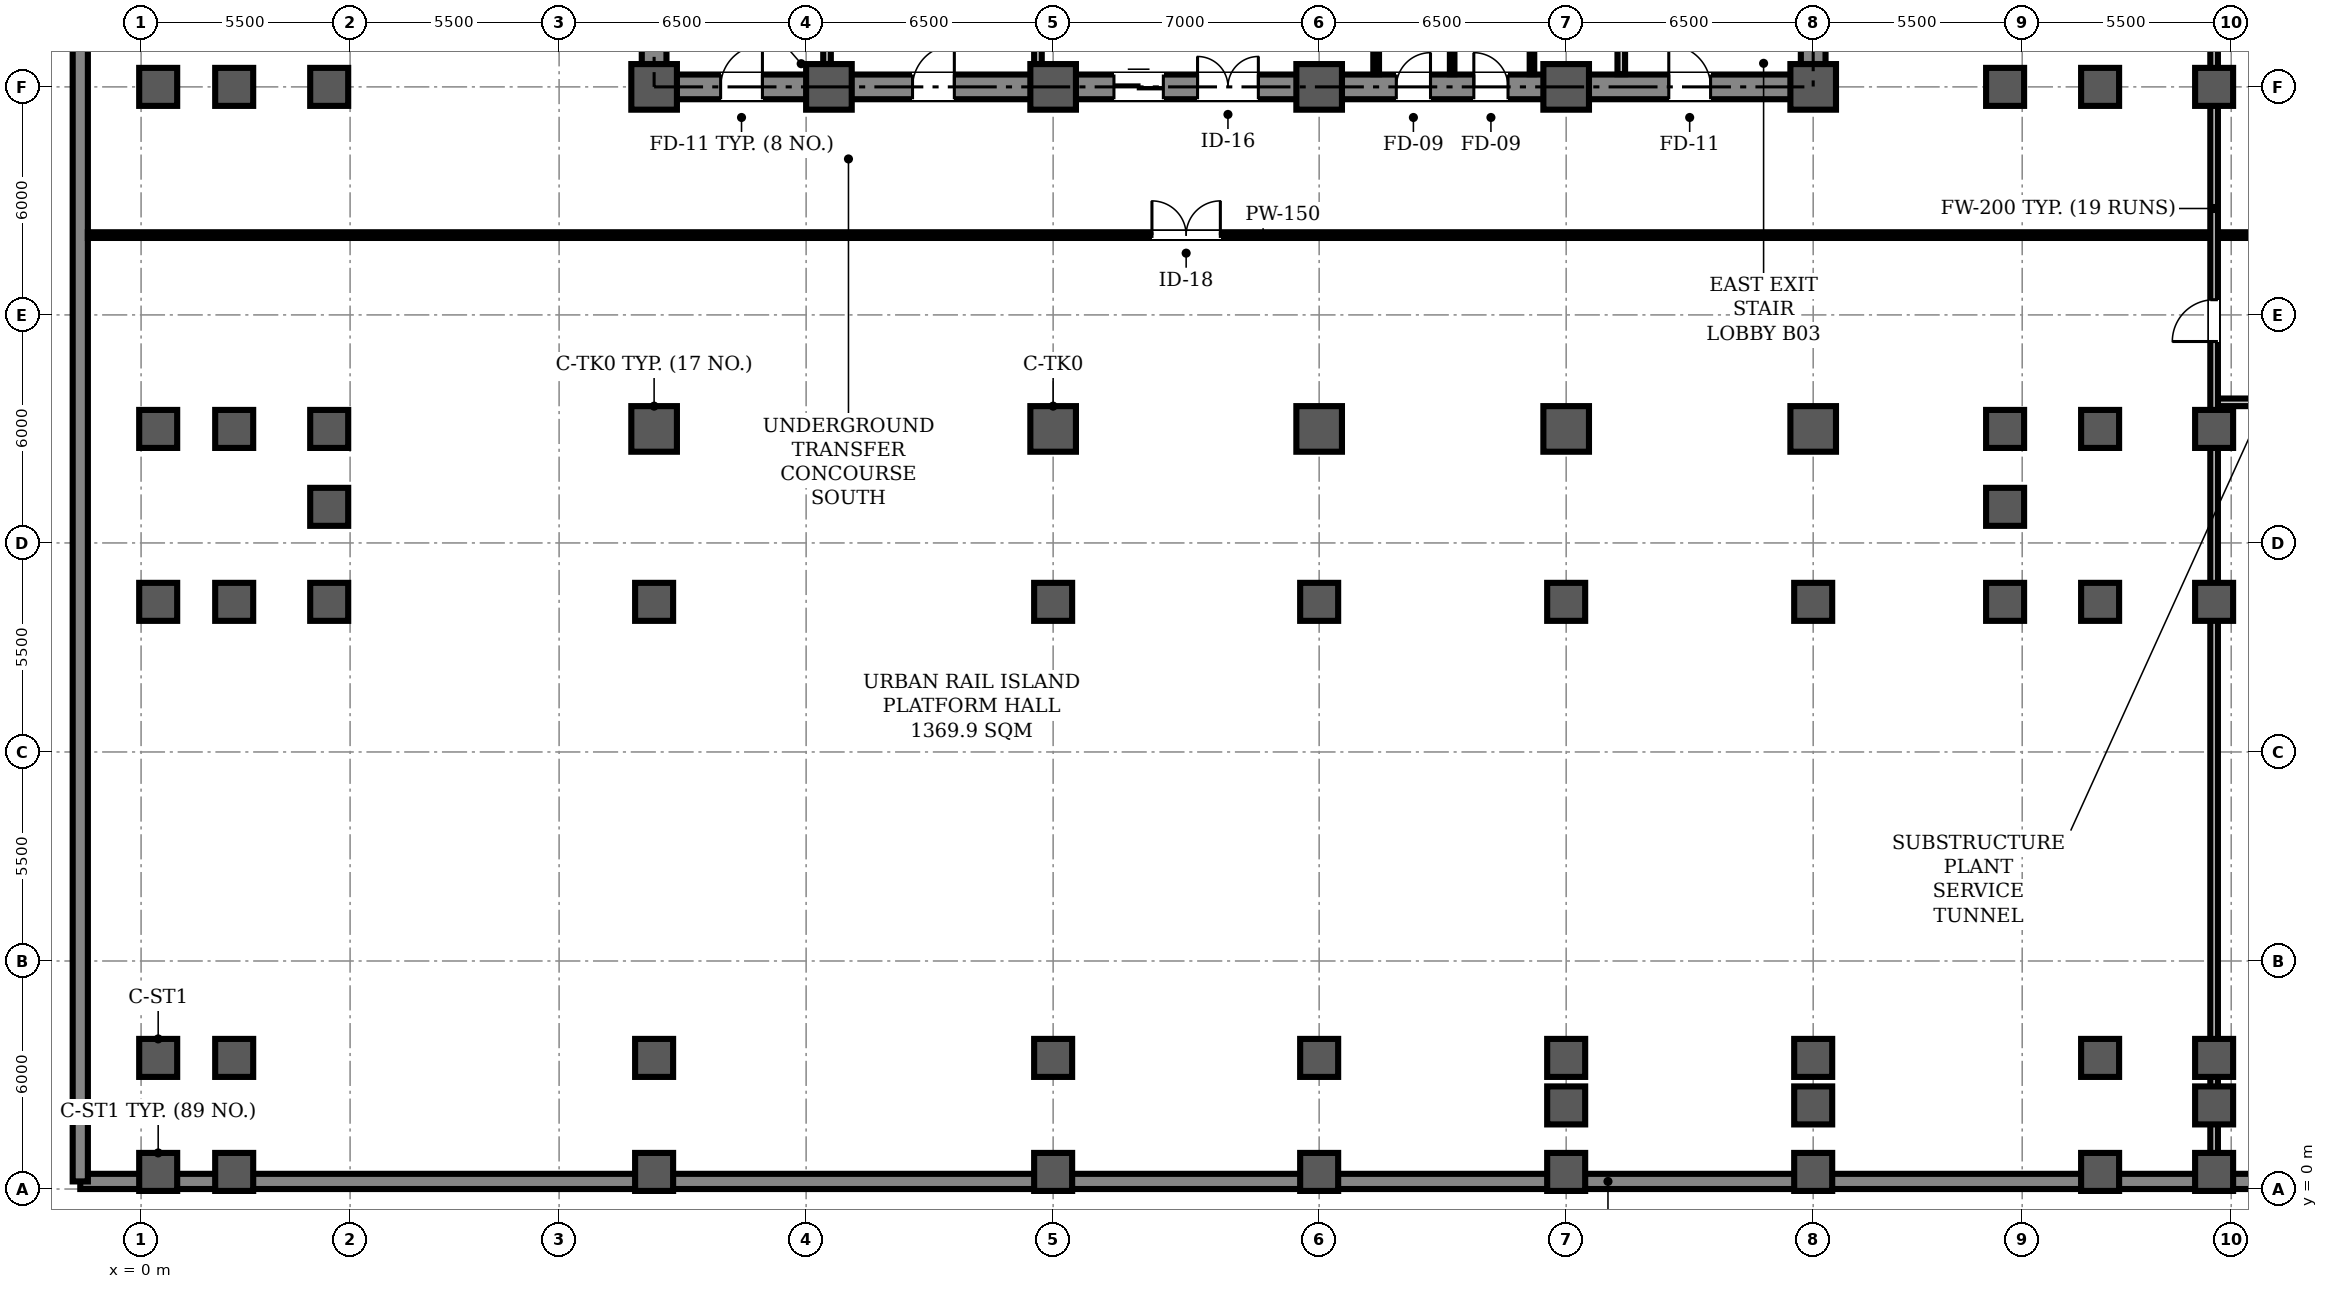
"""IFC4 building model, lengths in metres.
Left out: names, types, materials, properties, quantities, classifications, styles, units other than length and angle.
Written with IfcOpenShell. Run it as: python <this file> out.ifc"""

import sys

from ifc_helpers import new_model, si_unit, direction, frame, frame_2d, origin, origin_2d, place, context, subcontext, project, spatial, rectangle, hollow_rectangle, extrude, element, fill, save


model = new_model("IFC4")
c1 = context("Model", 3, precision=1e-05, world=origin(), true_north=direction((0.0, 1.0)))
c2 = subcontext(c1, "Body", "Model", "MODEL_VIEW")
j1 = project(units=[si_unit("LENGTHUNIT", "METRE"), si_unit("PLANEANGLEUNIT", "RADIAN")], contexts=[c1])
p1 = place(None, origin())
s1 = spatial("IfcSite", under=j1, at=p1, CompositionType="ELEMENT")
p2 = place(p1, origin())
s2 = spatial("IfcBuilding", under=s1, at=p2, CompositionType="ELEMENT")
p3 = place(p2, frame((0.0, 0.0, -15.6)))
s3 = spatial("IfcBuildingStorey", under=s2, at=p3, CompositionType="ELEMENT", Elevation=-15.6)
for number, where, z_axis, x_axis in (
    (1, (13.5, 29.0, 0.0), (0.0, 0.0, 1.0), (1.0, 0.0, 0.0)),
    (2, (18.1, 29.0, 0.0), (0.0, 0.0, 1.0), (1.0, 0.0, 0.0)),
    (3, (24.0, 29.0, 0.0), (0.0, 0.0, 1.0), (1.0, 0.0, 0.0)),
    (4, (31.0, 29.0, 0.0), (0.0, 0.0, 1.0), (1.0, 0.0, 0.0)),
    (5, (37.5, 29.0, 0.0), (0.0, 0.0, 1.0), (1.0, 0.0, 0.0)),
    (6, (44.0, 29.0, 0.0), (0.0, 0.0, 1.0), (1.0, 0.0, 0.0)),
    (7, (13.5, 20.0, 0.0), (0.0, 0.0, 1.0), (1.0, 0.0, 0.0)),
    (8, (24.0, 20.0, 0.0), (0.0, 0.0, 1.0), (1.0, 0.0, 0.0)),
    (9, (31.0, 20.0, 0.0), (0.0, 0.0, 1.0), (1.0, 0.0, 0.0)),
    (10, (37.5, 20.0, 0.0), (0.0, 0.0, 1.0), (1.0, 0.0, 0.0)),
    (11, (44.0, 20.0, 0.0), (0.0, 0.0, 1.0), (1.0, 0.0, 0.0)),
):
    element("IfcColumn", number, at=place(p3, frame(where, z_axis=z_axis, x_axis=x_axis)), inside=s3, PredefinedType="COLUMN", context=c2, shape_type="SweptSolid", body=[
        extrude(hollow_rectangle(XDim=1.2, YDim=1.2, WallThickness=0.04, InnerFilletRadius=0.02, OuterFilletRadius=0.06, at=origin_2d()), origin(), (0.0, 0.0, 1.0), 5.4),
    ])
for number, where, z_axis, x_axis in (
    (12, (0.45, 0.45, 0.0), (0.0, 0.0, 1.0), (1.0, 0.0, 0.0)),
    (13, (0.45, 3.45, 0.0), (0.0, 0.0, 1.0), (1.0, 0.0, 0.0)),
    (14, (0.45, 15.45, 0.0), (0.0, 0.0, 1.0), (1.0, 0.0, 0.0)),
    (15, (0.45, 20.0, 0.0), (0.0, 0.0, 1.0), (1.0, 0.0, 0.0)),
    (16, (0.45, 29.0, 0.0), (0.0, 0.0, 1.0), (1.0, 0.0, 0.0)),
    (17, (2.45, 0.45, 0.0), (0.0, 0.0, 1.0), (1.0, 0.0, 0.0)),
    (18, (2.45, 3.45, 0.0), (0.0, 0.0, 1.0), (1.0, 0.0, 0.0)),
    (19, (2.45, 15.45, 0.0), (0.0, 0.0, 1.0), (1.0, 0.0, 0.0)),
    (20, (2.45, 20.0, 0.0), (0.0, 0.0, 1.0), (1.0, 0.0, 0.0)),
    (21, (2.45, 29.0, 0.0), (0.0, 0.0, 1.0), (1.0, 0.0, 0.0)),
    (22, (4.95, 15.45, 0.0), (0.0, 0.0, 1.0), (1.0, 0.0, 0.0)),
    (23, (4.95, 17.95, 0.0), (0.0, 0.0, 1.0), (1.0, 0.0, 0.0)),
    (24, (4.95, 20.0, 0.0), (0.0, 0.0, 1.0), (1.0, 0.0, 0.0)),
    (25, (4.95, 29.0, 0.0), (0.0, 0.0, 1.0), (1.0, 0.0, 0.0)),
    (26, (13.5, 0.45, 0.0), (0.0, 0.0, 1.0), (1.0, 0.0, 0.0)),
    (27, (13.5, 3.45, 0.0), (0.0, 0.0, 1.0), (1.0, 0.0, 0.0)),
    (28, (13.5, 15.45, 0.0), (0.0, 0.0, 1.0), (1.0, 0.0, 0.0)),
    (29, (24.0, 0.45, 0.0), (0.0, 0.0, 1.0), (1.0, 0.0, 0.0)),
    (30, (24.0, 3.45, 0.0), (0.0, 0.0, 1.0), (1.0, 0.0, 0.0)),
    (31, (24.0, 15.45, 0.0), (0.0, 0.0, 1.0), (1.0, 0.0, 0.0)),
    (32, (31.0, 0.45, 0.0), (0.0, 0.0, 1.0), (1.0, 0.0, 0.0)),
    (33, (31.0, 3.45, 0.0), (0.0, 0.0, 1.0), (1.0, 0.0, 0.0)),
    (34, (31.0, 15.45, 0.0), (0.0, 0.0, 1.0), (1.0, 0.0, 0.0)),
    (35, (37.5, 0.45, 0.0), (0.0, 0.0, 1.0), (1.0, 0.0, 0.0)),
    (36, (37.5, 2.2, 0.0), (0.0, 0.0, 1.0), (1.0, 0.0, 0.0)),
    (37, (37.5, 3.45, 0.0), (0.0, 0.0, 1.0), (1.0, 0.0, 0.0)),
    (38, (37.5, 15.45, 0.0), (0.0, 0.0, 1.0), (1.0, 0.0, 0.0)),
    (39, (44.0, 0.45, 0.0), (0.0, 0.0, 1.0), (1.0, 0.0, 0.0)),
    (40, (44.0, 2.2, 0.0), (0.0, 0.0, 1.0), (1.0, 0.0, 0.0)),
    (41, (44.0, 3.45, 0.0), (0.0, 0.0, 1.0), (1.0, 0.0, 0.0)),
    (42, (44.0, 15.45, 0.0), (0.0, 0.0, 1.0), (1.0, 0.0, 0.0)),
    (43, (49.05, 15.45, 0.0), (0.0, 0.0, 1.0), (1.0, 0.0, 0.0)),
    (44, (49.05, 17.95, 0.0), (0.0, 0.0, 1.0), (1.0, 0.0, 0.0)),
    (45, (49.05, 20.0, 0.0), (0.0, 0.0, 1.0), (1.0, 0.0, 0.0)),
    (46, (49.05, 29.0, 0.0), (0.0, 0.0, 1.0), (1.0, 0.0, 0.0)),
    (47, (51.55, 0.45, 0.0), (0.0, 0.0, 1.0), (1.0, 0.0, 0.0)),
    (48, (51.55, 3.45, 0.0), (0.0, 0.0, 1.0), (1.0, 0.0, 0.0)),
    (49, (51.55, 15.45, 0.0), (0.0, 0.0, 1.0), (1.0, 0.0, 0.0)),
    (50, (51.55, 20.0, 0.0), (0.0, 0.0, 1.0), (1.0, 0.0, 0.0)),
    (51, (51.55, 29.0, 0.0), (0.0, 0.0, 1.0), (1.0, 0.0, 0.0)),
    (52, (54.55, 0.45, 0.0), (0.0, 0.0, 1.0), (1.0, 0.0, 0.0)),
    (53, (54.55, 2.2, 0.0), (0.0, 0.0, 1.0), (1.0, 0.0, 0.0)),
    (54, (54.55, 3.45, 0.0), (0.0, 0.0, 1.0), (1.0, 0.0, 0.0)),
    (55, (54.55, 15.45, 0.0), (0.0, 0.0, 1.0), (1.0, 0.0, 0.0)),
    (56, (54.55, 20.0, 0.0), (0.0, 0.0, 1.0), (1.0, 0.0, 0.0)),
    (57, (54.55, 29.0, 0.0), (0.0, 0.0, 1.0), (1.0, 0.0, 0.0)),
):
    element("IfcColumn", number, at=place(p3, frame(where, z_axis=z_axis, x_axis=x_axis)), inside=s3, PredefinedType="COLUMN", context=c2, shape_type="SweptSolid", body=[
        extrude(rectangle(XDim=1.0, YDim=1.0, at=origin_2d()), origin(), (0.0, 0.0, 1.0), 5.4),
    ])
p4 = place(p3, frame((-1.6, 0.2, 0.0), z_axis=(0.0, 0.0, 1.0), x_axis=(1.0, 0.0, 0.0)))
e58 = element("IfcWall", 58, at=p4, inside=s3, PredefinedType="SOLIDWALL", context=c2, shape_type="SweptSolid", body=[
    extrude(rectangle(XDim=80.4, YDim=0.4, at=frame_2d((40.2, 0.0))), origin(), (0.0, 0.0, 1.0), 5.12),
])
p5 = place(p3, frame((-1.6, 51.4, 0.0), z_axis=(0.0, 0.0, 1.0), x_axis=(0.0, -1.0, 0.0)))
e59 = element("IfcWall", 59, at=p5, inside=s3, PredefinedType="SOLIDWALL", context=c2, shape_type="SweptSolid", body=[
    extrude(rectangle(XDim=51.2, YDim=0.4, at=frame_2d((25.6, 0.0))), origin(), (0.0, 0.0, 1.0), 5.12),
])
p6 = place(p3, frame((13.5, 29.0, 0.0), z_axis=(0.0, 0.0, 1.0), x_axis=(1.0, 0.0, 0.0)))
e60 = element("IfcWall", 60, at=p6, inside=s3, PredefinedType="SHEAR", context=c2, shape_type="SweptSolid", body=[
    extrude(rectangle(XDim=30.5, YDim=0.65, at=frame_2d((15.25, 0.0))), origin(), (0.0, 0.0, 1.0), 5.12),
])
p7 = place(p6, frame((1.75, 0.0, 0.0)))
e61 = element("IfcOpeningElement", 61, at=p7, cuts=e60, PredefinedType="OPENING", context=c2, shape_type="SweptSolid", body=[
    extrude(rectangle(XDim=1.1, YDim=2.08, at=frame_2d((0.55, 1.04))), frame((0.0, 0.335, 0.0), z_axis=(0.0, -1.0, 0.0), x_axis=(1.0, 0.0, 0.0)), (0.0, 0.0, 1.0), 0.67),
])
p8 = place(p6, frame((26.7, 0.0, 0.0)))
e62 = element("IfcOpeningElement", 62, at=p8, cuts=e60, PredefinedType="OPENING", context=c2, shape_type="SweptSolid", body=[
    extrude(rectangle(XDim=1.1, YDim=2.08, at=frame_2d((0.55, 1.04))), frame((0.0, 0.335, 0.0), z_axis=(0.0, -1.0, 0.0), x_axis=(1.0, 0.0, 0.0)), (0.0, 0.0, 1.0), 0.67),
])
p9 = place(p6, frame((6.8, 0.0, 0.0)))
e63 = element("IfcOpeningElement", 63, at=p9, cuts=e60, PredefinedType="OPENING", context=c2, shape_type="SweptSolid", body=[
    extrude(rectangle(XDim=1.1, YDim=2.08, at=frame_2d((0.55, 1.04))), frame((0.0, 0.335, 0.0), z_axis=(0.0, -1.0, 0.0), x_axis=(1.0, 0.0, 0.0)), (0.0, 0.0, 1.0), 0.67),
])
p10 = place(p6, frame((14.3, 0.0, 0.0)))
e64 = element("IfcOpeningElement", 64, at=p10, cuts=e60, PredefinedType="OPENING", context=c2, shape_type="SweptSolid", body=[
    extrude(rectangle(XDim=1.6, YDim=2.08, at=frame_2d((0.8, 1.04))), frame((0.0, 0.335, 0.0), z_axis=(0.0, -1.0, 0.0), x_axis=(1.0, 0.0, 0.0)), (0.0, 0.0, 1.0), 0.67),
])
p11 = place(p6, frame((19.53, 0.0, 0.0)))
e65 = element("IfcOpeningElement", 65, at=p11, cuts=e60, PredefinedType="OPENING", context=c2, shape_type="SweptSolid", body=[
    extrude(rectangle(XDim=0.9, YDim=2.08, at=frame_2d((0.45, 1.04))), frame((0.0, 0.335, 0.0), z_axis=(0.0, -1.0, 0.0), x_axis=(1.0, 0.0, 0.0)), (0.0, 0.0, 1.0), 0.67),
])
p12 = place(p6, frame((21.57, 0.0, 0.0)))
e66 = element("IfcOpeningElement", 66, at=p12, cuts=e60, PredefinedType="OPENING", context=c2, shape_type="SweptSolid", body=[
    extrude(rectangle(XDim=0.9, YDim=2.08, at=frame_2d((0.45, 1.04))), frame((0.0, 0.335, 0.0), z_axis=(0.0, -1.0, 0.0), x_axis=(1.0, 0.0, 0.0)), (0.0, 0.0, 1.0), 0.67),
])
p13 = place(p6, frame((12.1, 0.0, 0.0)))
e67 = element("IfcOpeningElement", 67, at=p13, cuts=e60, PredefinedType="OPENING", context=c2, shape_type="SweptSolid", body=[
    extrude(rectangle(XDim=1.3, YDim=2.08, at=frame_2d((0.65, 1.04))), frame((0.0, 0.335, 0.0), z_axis=(0.0, -1.0, 0.0), x_axis=(1.0, 0.0, 0.0)), (0.0, 0.0, 1.0), 0.67),
])
for number, where, z_axis, x_axis in (
    (68, (13.5, 29.35, 0.0), (0.0, 0.0, 1.0), (0.0, 1.0, 0.0)),
    (69, (44.0, 29.35, 0.0), (0.0, 0.0, 1.0), (0.0, 1.0, 0.0)),
):
    element("IfcWall", number, at=place(p3, frame(where, z_axis=z_axis, x_axis=x_axis)), inside=s3, PredefinedType="SHEAR", context=c2, shape_type="SweptSolid", body=[
        extrude(rectangle(XDim=8.6, YDim=0.65, at=frame_2d((4.3, 0.0))), origin(), (0.0, 0.0, 1.0), 5.12),
    ])
p14 = place(p3, frame((-1.4, 25.1, 0.0), z_axis=(0.0, 0.0, 1.0), x_axis=(1.0, 0.0, 0.0)))
e70 = element("IfcWall", 70, at=p14, inside=s3, PredefinedType="PARTITIONING", context=c2, shape_type="SweptSolid", body=[
    extrude(rectangle(XDim=61.85, YDim=0.15, at=frame_2d((30.925, 0.0))), origin(), (0.0, 0.0, 1.0), 4.4),
])
p15 = place(p14, frame((28.0, 0.0, 0.0)))
e71 = element("IfcOpeningElement", 71, at=p15, cuts=e70, PredefinedType="OPENING", context=c2, shape_type="SweptSolid", body=[
    extrude(rectangle(XDim=1.8, YDim=2.08, at=frame_2d((0.9, 1.04))), frame((0.0, 0.085, 0.0), z_axis=(0.0, -1.0, 0.0), x_axis=(1.0, 0.0, 0.0)), (0.0, 0.0, 1.0), 0.17),
])
p16 = place(p3, frame((54.55, 20.7, 0.0), z_axis=(0.0, 0.0, 1.0), x_axis=(1.0, 0.0, 0.0)))
e72 = element("IfcWall", 72, at=p16, inside=s3, PredefinedType="STANDARD", context=c2, shape_type="SweptSolid", body=[
    extrude(rectangle(XDim=5.9, YDim=0.2, at=frame_2d((2.95, 0.0))), origin(), (0.0, 0.0, 1.0), 4.4),
])
p17 = place(p3, frame((54.55, 0.4, 0.0), z_axis=(0.0, 0.0, 1.0), x_axis=(0.0, 1.0, 0.0)))
e73 = element("IfcWall", 73, at=p17, inside=s3, PredefinedType="STANDARD", context=c2, shape_type="SweptSolid", body=[
    extrude(rectangle(XDim=50.8, YDim=0.2, at=frame_2d((25.4, 0.0))), origin(), (0.0, 0.0, 1.0), 4.3),
])
p18 = place(p17, frame((21.9, 0.0, 0.0)))
e74 = element("IfcOpeningElement", 74, at=p18, cuts=e73, PredefinedType="OPENING", context=c2, shape_type="SweptSolid", body=[
    extrude(rectangle(XDim=1.1, YDim=2.08, at=frame_2d((0.55, 1.04))), frame((0.0, 0.11, 0.0), z_axis=(0.0, -1.0, 0.0), x_axis=(1.0, 0.0, 0.0)), (0.0, 0.0, 1.0), 0.22),
])
for number, where, z_axis, x_axis in (
    (75, (18.05, 29.335, 0.0), (0.0, 0.0, 1.0), (0.0, 1.0, 0.0)),
    (76, (38.95, 29.335, 0.0), (0.0, 0.0, 1.0), (0.0, 1.0, 0.0)),
):
    element("IfcWall", number, at=place(p3, frame(where, z_axis=z_axis, x_axis=x_axis)), inside=s3, PredefinedType="STANDARD", context=c2, shape_type="SweptSolid", body=[
        extrude(rectangle(XDim=0.965, YDim=0.2, at=frame_2d((0.482, 0.0))), origin(), (0.0, 0.0, 1.0), 4.3),
    ])
p19 = place(p3, frame((23.6, 29.335, 0.0), z_axis=(0.0, 0.0, 1.0), x_axis=(0.0, 1.0, 0.0)))
e77 = element("IfcWall", 77, at=p19, inside=s3, PredefinedType="STANDARD", context=c2, shape_type="SweptSolid", body=[
    extrude(rectangle(XDim=5.365, YDim=0.2, at=frame_2d((2.683, 0.0))), origin(), (0.0, 0.0, 1.0), 4.3),
])
p20 = place(p3, frame((32.5, 29.335, 0.0), z_axis=(0.0, 0.0, 1.0), x_axis=(0.0, 1.0, 0.0)))
e78 = element("IfcWall", 78, at=p20, inside=s3, PredefinedType="PARTITIONING", context=c2, shape_type="SweptSolid", body=[
    extrude(rectangle(XDim=2.43, YDim=0.15, at=frame_2d((1.215, 0.0))), origin(), (0.0, 0.0, 1.0), 4.3),
])
for number, where, z_axis, x_axis in (
    (79, (36.6, 29.335, 0.0), (0.0, 0.0, 1.0), (0.0, 1.0, 0.0)),
    (80, (34.5, 29.335, 0.0), (0.0, 0.0, 1.0), (0.0, 1.0, 0.0)),
):
    element("IfcWall", number, at=place(p3, frame(where, z_axis=z_axis, x_axis=x_axis)), inside=s3, PredefinedType="PARTITIONING", context=c2, shape_type="SweptSolid", body=[
        extrude(rectangle(XDim=2.43, YDim=0.12, at=frame_2d((1.215, 0.0))), origin(), (0.0, 0.0, 1.0), 4.3),
    ])
p21 = place(p15, origin())
e81 = element("IfcDoor", 81, at=p21, inside=s3, OperationType="DOUBLE_DOOR_SINGLE_SWING", PredefinedType="DOOR", context=c2, shape_type="SweptSolid", body=[
    extrude(rectangle(XDim=1.8, YDim=2.08, at=frame_2d((0.9, 1.04))), frame((0.0, 0.025, 0.0), z_axis=(0.0, -1.0, 0.0), x_axis=(1.0, 0.0, 0.0)), (0.0, 0.0, 1.0), 0.05),
])
fill(e71, e81)
p22 = place(p18, origin())
e82 = element("IfcDoor", 82, at=p22, inside=s3, OperationType="SINGLE_SWING_LEFT", PredefinedType="DOOR", context=c2, shape_type="SweptSolid", body=[
    extrude(rectangle(XDim=1.1, YDim=2.08, at=frame_2d((0.55, 1.04))), frame((0.0, 0.025, 0.0), z_axis=(0.0, -1.0, 0.0), x_axis=(1.0, 0.0, 0.0)), (0.0, 0.0, 1.0), 0.05),
])
fill(e74, e82)
p23 = place(p7, origin())
e83 = element("IfcDoor", 83, at=p23, inside=s3, OperationType="SINGLE_SWING_RIGHT", PredefinedType="DOOR", context=c2, shape_type="SweptSolid", body=[
    extrude(rectangle(XDim=1.1, YDim=2.08, at=frame_2d((0.55, 1.04))), frame((0.0, 0.025, 0.0), z_axis=(0.0, -1.0, 0.0), x_axis=(1.0, 0.0, 0.0)), (0.0, 0.0, 1.0), 0.05),
])
fill(e61, e83)
p24 = place(p8, origin())
e84 = element("IfcDoor", 84, at=p24, inside=s3, OperationType="SINGLE_SWING_LEFT", PredefinedType="DOOR", context=c2, shape_type="SweptSolid", body=[
    extrude(rectangle(XDim=1.1, YDim=2.08, at=frame_2d((0.55, 1.04))), frame((0.0, 0.025, 0.0), z_axis=(0.0, -1.0, 0.0), x_axis=(1.0, 0.0, 0.0)), (0.0, 0.0, 1.0), 0.05),
])
fill(e62, e84)
p25 = place(p9, origin())
e85 = element("IfcDoor", 85, at=p25, inside=s3, OperationType="SINGLE_SWING_RIGHT", PredefinedType="DOOR", context=c2, shape_type="SweptSolid", body=[
    extrude(rectangle(XDim=1.1, YDim=2.08, at=frame_2d((0.55, 1.04))), frame((0.0, 0.025, 0.0), z_axis=(0.0, -1.0, 0.0), x_axis=(1.0, 0.0, 0.0)), (0.0, 0.0, 1.0), 0.05),
])
fill(e63, e85)
p26 = place(p10, origin())
e86 = element("IfcDoor", 86, at=p26, inside=s3, OperationType="DOUBLE_DOOR_SINGLE_SWING", PredefinedType="DOOR", context=c2, shape_type="SweptSolid", body=[
    extrude(rectangle(XDim=1.6, YDim=2.08, at=frame_2d((0.8, 1.04))), frame((0.0, 0.025, 0.0), z_axis=(0.0, -1.0, 0.0), x_axis=(1.0, 0.0, 0.0)), (0.0, 0.0, 1.0), 0.05),
])
fill(e64, e86)
p27 = place(p11, origin())
e87 = element("IfcDoor", 87, at=p27, inside=s3, OperationType="SINGLE_SWING_RIGHT", PredefinedType="DOOR", context=c2, shape_type="SweptSolid", body=[
    extrude(rectangle(XDim=0.9, YDim=2.08, at=frame_2d((0.45, 1.04))), frame((0.0, 0.025, 0.0), z_axis=(0.0, -1.0, 0.0), x_axis=(1.0, 0.0, 0.0)), (0.0, 0.0, 1.0), 0.05),
])
fill(e65, e87)
p28 = place(p12, origin())
e88 = element("IfcDoor", 88, at=p28, inside=s3, OperationType="SINGLE_SWING_LEFT", PredefinedType="DOOR", context=c2, shape_type="SweptSolid", body=[
    extrude(rectangle(XDim=0.9, YDim=2.08, at=frame_2d((0.45, 1.04))), frame((0.0, 0.025, 0.0), z_axis=(0.0, -1.0, 0.0), x_axis=(1.0, 0.0, 0.0)), (0.0, 0.0, 1.0), 0.05),
])
fill(e66, e88)
p29 = place(p13, origin())
e89 = element("IfcDoor", 89, at=p29, inside=s3, OperationType="DOUBLE_DOOR_SLIDING", PredefinedType="DOOR", context=c2, shape_type="SweptSolid", body=[
    extrude(rectangle(XDim=1.3, YDim=2.08, at=frame_2d((0.65, 1.04))), frame((0.0, 0.025, 0.0), z_axis=(0.0, -1.0, 0.0), x_axis=(1.0, 0.0, 0.0)), (0.0, 0.0, 1.0), 0.05),
])
fill(e67, e89)
save(model, sys.argv[1])
